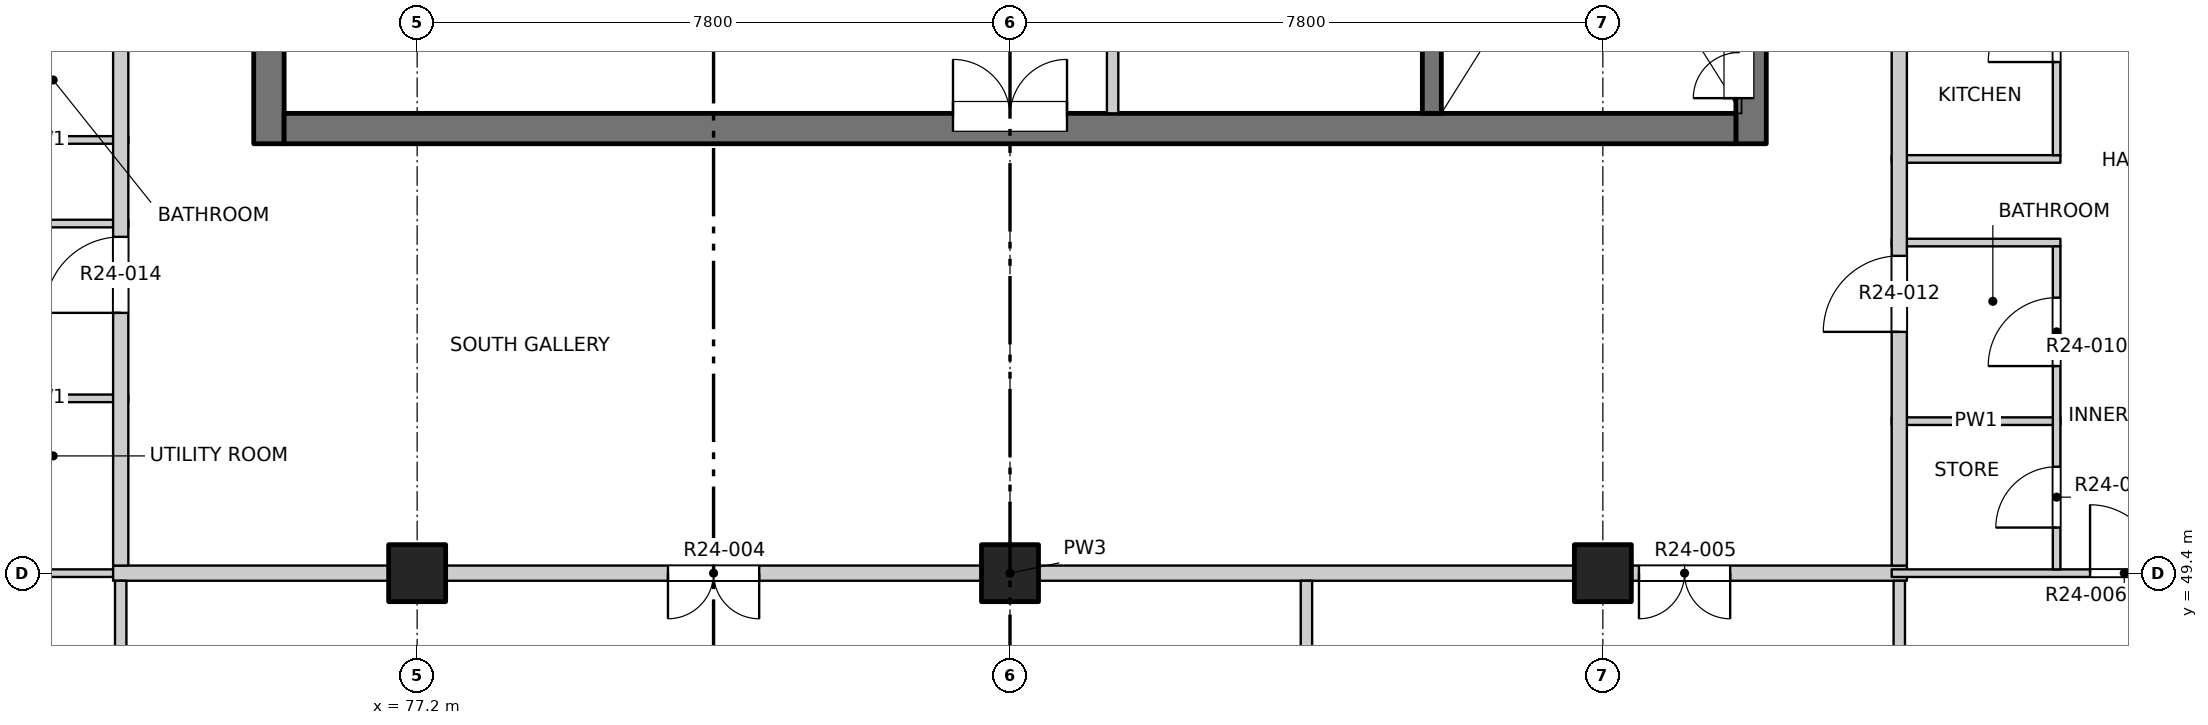
"""IFC4 building model, lengths in metres.
Left out: names, types, materials, properties, quantities, classifications, styles, units other than length and angle.
Written with IfcOpenShell. Run it as: python <this file> out.ifc"""

import sys

from ifc_helpers import new_model, si_unit, direction, frame, frame_2d, origin, origin_2d, place, context, subcontext, project, spatial, rectangle, extrude, element, fill, save


model = new_model("IFC4")
c1 = context("Model", 3, precision=1e-05, world=origin(), true_north=direction((0.0, 1.0)))
c2 = subcontext(c1, "Body", "Model", "MODEL_VIEW")
j1 = project(units=[si_unit("LENGTHUNIT", "METRE"), si_unit("PLANEANGLEUNIT", "RADIAN")], contexts=[c1])
p1 = place(None, origin())
s1 = spatial("IfcSite", under=j1, at=p1, CompositionType="ELEMENT")
p2 = place(p1, origin())
s2 = spatial("IfcBuilding", under=s1, at=p2, CompositionType="ELEMENT")
p3 = place(p2, frame((0.0, 0.0, 246.0)))
s3 = spatial("IfcBuildingStorey", under=s2, at=p3, CompositionType="ELEMENT", Elevation=246.0)
for number, where, z_axis, x_axis in (
    (1, (77.2, 49.4, -0.3), (0.0, 0.0, 1.0), (1.0, 0.0, 0.0)),
    (2, (85.0, 49.4, -0.3), (0.0, 0.0, 1.0), (1.0, 0.0, 0.0)),
    (3, (92.8, 49.4, -0.3), (0.0, 0.0, 1.0), (1.0, 0.0, 0.0)),
):
    element("IfcColumn", number, at=place(p3, frame(where, z_axis=z_axis, x_axis=x_axis)), inside=s3, PredefinedType="COLUMN", context=c2, shape_type="SweptSolid", body=[
        extrude(rectangle(XDim=0.75, YDim=0.75, at=origin_2d()), origin(), (0.0, 0.0, 1.0), 3.45),
    ])
p4 = place(p3, frame((75.25, 55.05, -0.3), z_axis=(0.0, 0.0, 1.0), x_axis=(0.0, 1.0, 0.0)))
e4 = element("IfcWall", 4, at=p4, inside=s3, PredefinedType="SOLIDWALL", context=c2, shape_type="SweptSolid", body=[
    extrude(rectangle(XDim=22.25, YDim=0.4, at=frame_2d((11.125, 0.0))), origin(), (0.0, 0.0, 1.0), 3.45),
])
p5 = place(p4, frame((7.4, 0.0, 0.3)))
e5 = element("IfcOpeningElement", 5, at=p5, cuts=e4, PredefinedType="OPENING", context=c2, shape_type="SweptSolid", body=[
    extrude(rectangle(XDim=0.9, YDim=2.1, at=frame_2d((0.45, 1.05))), frame((0.0, 0.21, 0.0), z_axis=(0.0, -1.0, 0.0), x_axis=(1.0, 0.0, 0.0)), (0.0, 0.0, 1.0), 0.42),
])
p6 = place(p4, frame((12.05, 0.0, 0.3)))
e6 = element("IfcOpeningElement", 6, at=p6, cuts=e4, PredefinedType="OPENING", context=c2, shape_type="SweptSolid", body=[
    extrude(rectangle(XDim=0.9, YDim=2.1, at=frame_2d((0.45, 1.05))), frame((0.0, 0.21, 0.0), z_axis=(0.0, -1.0, 0.0), x_axis=(1.0, 0.0, 0.0)), (0.0, 0.0, 1.0), 0.42),
])
p7 = place(p4, frame((16.55, 0.0, 0.3)))
e7 = element("IfcOpeningElement", 7, at=p7, cuts=e4, PredefinedType="OPENING", context=c2, shape_type="SweptSolid", body=[
    extrude(rectangle(XDim=0.9, YDim=2.1, at=frame_2d((0.45, 1.05))), frame((0.0, 0.21, 0.0), z_axis=(0.0, -1.0, 0.0), x_axis=(1.0, 0.0, 0.0)), (0.0, 0.0, 1.0), 0.42),
])
p8 = place(p4, frame((20.0, 0.0, 0.3)))
e8 = element("IfcOpeningElement", 8, at=p8, cuts=e4, PredefinedType="OPENING", context=c2, shape_type="SweptSolid", body=[
    extrude(rectangle(XDim=0.9, YDim=2.1, at=frame_2d((0.45, 1.05))), frame((0.0, 0.21, 0.0), z_axis=(0.0, -1.0, 0.0), x_axis=(1.0, 0.0, 0.0)), (0.0, 0.0, 1.0), 0.42),
])
p9 = place(p3, frame((94.75, 55.05, -0.3), z_axis=(0.0, 0.0, 1.0), x_axis=(0.0, 1.0, 0.0)))
e9 = element("IfcWall", 9, at=p9, inside=s3, PredefinedType="SOLIDWALL", context=c2, shape_type="SweptSolid", body=[
    extrude(rectangle(XDim=6.9, YDim=0.4, at=frame_2d((3.45, 0.0))), origin(), (0.0, 0.0, 1.0), 3.45),
])
p10 = place(p9, frame((0.6, 0.0, 0.3)))
e10 = element("IfcOpeningElement", 10, at=p10, cuts=e9, PredefinedType="OPENING", context=c2, shape_type="SweptSolid", body=[
    extrude(rectangle(XDim=1.2, YDim=2.1, at=frame_2d((0.6, 1.05))), frame((0.0, 0.21, 0.0), z_axis=(0.0, -1.0, 0.0), x_axis=(1.0, 0.0, 0.0)), (0.0, 0.0, 1.0), 0.42),
])
p11 = place(p3, frame((75.45, 55.25, -0.3), z_axis=(0.0, 0.0, 1.0), x_axis=(1.0, 0.0, 0.0)))
e11 = element("IfcWall", 11, at=p11, inside=s3, PredefinedType="SOLIDWALL", context=c2, shape_type="SweptSolid", body=[
    extrude(rectangle(XDim=19.1, YDim=0.4, at=frame_2d((9.55, 0.0))), origin(), (0.0, 0.0, 1.0), 3.45),
])
p12 = place(p11, frame((8.8, 0.0, 0.3)))
e12 = element("IfcOpeningElement", 12, at=p12, cuts=e11, PredefinedType="OPENING", context=c2, shape_type="SweptSolid", body=[
    extrude(rectangle(XDim=1.5, YDim=2.1, at=frame_2d((0.75, 1.05))), frame((0.0, 0.21, 0.0), z_axis=(0.0, -1.0, 0.0), x_axis=(1.0, 0.0, 0.0)), (0.0, 0.0, 1.0), 0.42),
])
p13 = place(p3, frame((90.55, 55.45, -0.3), z_axis=(0.0, 0.0, 1.0), x_axis=(0.0, 1.0, 0.0)))
e13 = element("IfcWall", 13, at=p13, inside=s3, PredefinedType="SOLIDWALL", context=c2, shape_type="SweptSolid", body=[
    extrude(rectangle(XDim=6.5, YDim=0.25, at=frame_2d((3.25, 0.0))), origin(), (0.0, 0.0, 1.0), 3.45),
])
p14 = place(p3, frame((65.8, 49.4, 0.0), z_axis=(0.0, 0.0, 1.0), x_axis=(1.0, 0.0, 0.0)))
e14 = element("IfcWall", 14, at=p14, inside=s3, PredefinedType="PARTITIONING", context=c2, shape_type="SweptSolid", body=[
    extrude(rectangle(XDim=7.6, YDim=0.1, at=frame_2d((3.8, 0.0))), origin(), (0.0, 0.0, 1.0), 3.15),
])
p15 = place(p14, frame((4.09, 0.0, 0.0)))
e15 = element("IfcOpeningElement", 15, at=p15, cuts=e14, PredefinedType="OPENING", context=c2, shape_type="SweptSolid", body=[
    extrude(rectangle(XDim=0.9, YDim=2.1, at=frame_2d((0.45, 1.05))), frame((0.0, 0.06, 0.0), z_axis=(0.0, -1.0, 0.0), x_axis=(1.0, 0.0, 0.0)), (0.0, 0.0, 1.0), 0.12),
])
p16 = place(p3, frame((73.2, 49.4, 0.0), z_axis=(0.0, 0.0, 1.0), x_axis=(1.0, 0.0, 0.0)))
e16 = element("IfcWall", 16, at=p16, inside=s3, PredefinedType="PARTITIONING", context=c2, shape_type="SweptSolid", body=[
    extrude(rectangle(XDim=23.6, YDim=0.2, at=frame_2d((11.8, 0.0))), origin(), (0.0, 0.0, 1.0), 3.15),
])
p17 = place(p16, frame((7.3, 0.0, 0.0)))
e17 = element("IfcOpeningElement", 17, at=p17, cuts=e16, PredefinedType="OPENING", context=c2, shape_type="SweptSolid", body=[
    extrude(rectangle(XDim=1.2, YDim=2.1, at=frame_2d((0.6, 1.05))), frame((0.0, 0.11, 0.0), z_axis=(0.0, -1.0, 0.0), x_axis=(1.0, 0.0, 0.0)), (0.0, 0.0, 1.0), 0.22),
])
p18 = place(p16, frame((20.075, 0.0, 0.0)))
e18 = element("IfcOpeningElement", 18, at=p18, cuts=e16, PredefinedType="OPENING", context=c2, shape_type="SweptSolid", body=[
    extrude(rectangle(XDim=1.2, YDim=2.1, at=frame_2d((0.6, 1.05))), frame((0.0, 0.11, 0.0), z_axis=(0.0, -1.0, 0.0), x_axis=(1.0, 0.0, 0.0)), (0.0, 0.0, 1.0), 0.22),
])
p19 = place(p3, frame((96.6, 49.4, 0.0), z_axis=(0.0, 0.0, 1.0), x_axis=(1.0, 0.0, 0.0)))
e19 = element("IfcWall", 19, at=p19, inside=s3, PredefinedType="PARTITIONING", context=c2, shape_type="SweptSolid", body=[
    extrude(rectangle(XDim=7.6, YDim=0.1, at=frame_2d((3.8, 0.0))), origin(), (0.0, 0.0, 1.0), 3.15),
])
p20 = place(p19, frame((2.61, 0.0, 0.0)))
e20 = element("IfcOpeningElement", 20, at=p20, cuts=e19, PredefinedType="OPENING", context=c2, shape_type="SweptSolid", body=[
    extrude(rectangle(XDim=0.9, YDim=2.1, at=frame_2d((0.45, 1.05))), frame((0.0, 0.06, 0.0), z_axis=(0.0, -1.0, 0.0), x_axis=(1.0, 0.0, 0.0)), (0.0, 0.0, 1.0), 0.12),
])
for number, where, z_axis, x_axis in (
    (21, (96.6, 51.4, 0.0), (0.0, 0.0, 1.0), (1.0, 0.0, 0.0)),
    (22, (71.18, 51.7, 0.0), (0.0, 0.0, 1.0), (1.0, 0.0, 0.0)),
    (23, (96.6, 53.75, 0.0), (0.0, 0.0, 1.0), (1.0, 0.0, 0.0)),
    (24, (71.18, 54.0, 0.0), (0.0, 0.0, 1.0), (1.0, 0.0, 0.0)),
    (25, (96.6, 54.85, 0.0), (0.0, 0.0, 1.0), (1.0, 0.0, 0.0)),
    (26, (71.18, 55.1, 0.0), (0.0, 0.0, 1.0), (1.0, 0.0, 0.0)),
):
    element("IfcWall", number, at=place(p3, frame(where, z_axis=z_axis, x_axis=x_axis)), inside=s3, PredefinedType="PARTITIONING", context=c2, shape_type="SweptSolid", body=[
        extrude(rectangle(XDim=2.22, YDim=0.1, at=frame_2d((1.11, 0.0))), origin(), (0.0, 0.0, 1.0), 3.15),
    ])
p21 = place(p3, frame((73.3, 45.8, 0.0), z_axis=(0.0, 0.0, 1.0), x_axis=(0.0, 1.0, 0.0)))
e27 = element("IfcWall", 27, at=p21, inside=s3, PredefinedType="PARTITIONING", context=c2, shape_type="SweptSolid", body=[
    extrude(rectangle(XDim=3.5, YDim=0.15, at=frame_2d((1.75, 0.0))), origin(), (0.0, 0.0, 1.0), 3.15),
])
p22 = place(p3, frame((73.3, 49.5, 0.0), z_axis=(0.0, 0.0, 1.0), x_axis=(0.0, 1.0, 0.0)))
e28 = element("IfcWall", 28, at=p22, inside=s3, PredefinedType="PARTITIONING", context=c2, shape_type="SweptSolid", body=[
    extrude(rectangle(XDim=34.7, YDim=0.2, at=frame_2d((17.35, 0.0))), origin(), (0.0, 0.0, 1.0), 3.15),
])
p23 = place(p22, frame((3.325, 0.0, 0.0)))
e29 = element("IfcOpeningElement", 29, at=p23, cuts=e28, PredefinedType="OPENING", context=c2, shape_type="SweptSolid", body=[
    extrude(rectangle(XDim=1.0, YDim=2.1, at=frame_2d((0.5, 1.05))), frame((0.0, 0.11, 0.0), z_axis=(0.0, -1.0, 0.0), x_axis=(1.0, 0.0, 0.0)), (0.0, 0.0, 1.0), 0.22),
])
p24 = place(p22, frame((17.875, 0.0, 0.0)))
e30 = element("IfcOpeningElement", 30, at=p24, cuts=e28, PredefinedType="OPENING", context=c2, shape_type="SweptSolid", body=[
    extrude(rectangle(XDim=1.0, YDim=2.1, at=frame_2d((0.5, 1.05))), frame((0.0, 0.11, 0.0), z_axis=(0.0, -1.0, 0.0), x_axis=(1.0, 0.0, 0.0)), (0.0, 0.0, 1.0), 0.22),
])
p25 = place(p22, frame((25.775, 0.0, 0.0)))
e31 = element("IfcOpeningElement", 31, at=p25, cuts=e28, PredefinedType="OPENING", context=c2, shape_type="SweptSolid", body=[
    extrude(rectangle(XDim=1.0, YDim=2.1, at=frame_2d((0.5, 1.05))), frame((0.0, 0.11, 0.0), z_axis=(0.0, -1.0, 0.0), x_axis=(1.0, 0.0, 0.0)), (0.0, 0.0, 1.0), 0.22),
])
p26 = place(p3, frame((86.35, 55.45, 0.0), z_axis=(0.0, 0.0, 1.0), x_axis=(0.0, 1.0, 0.0)))
e32 = element("IfcWall", 32, at=p26, inside=s3, PredefinedType="PARTITIONING", context=c2, shape_type="SweptSolid", body=[
    extrude(rectangle(XDim=5.575, YDim=0.15, at=frame_2d((2.788, 0.0))), origin(), (0.0, 0.0, 1.0), 3.15),
])
p27 = place(p26, frame((2.25, 0.0, 0.0)))
e33 = element("IfcOpeningElement", 33, at=p27, cuts=e32, PredefinedType="OPENING", context=c2, shape_type="SweptSolid", body=[
    extrude(rectangle(XDim=0.9, YDim=2.1, at=frame_2d((0.45, 1.05))), frame((0.0, 0.085, 0.0), z_axis=(0.0, -1.0, 0.0), x_axis=(1.0, 0.0, 0.0)), (0.0, 0.0, 1.0), 0.17),
])
p28 = place(p3, frame((88.9, 45.8, 0.0), z_axis=(0.0, 0.0, 1.0), x_axis=(0.0, 1.0, 0.0)))
e34 = element("IfcWall", 34, at=p28, inside=s3, PredefinedType="PARTITIONING", context=c2, shape_type="SweptSolid", body=[
    extrude(rectangle(XDim=3.5, YDim=0.15, at=frame_2d((1.75, 0.0))), origin(), (0.0, 0.0, 1.0), 2.55),
])
p29 = place(p3, frame((96.7, 45.8, 0.0), z_axis=(0.0, 0.0, 1.0), x_axis=(0.0, 1.0, 0.0)))
e35 = element("IfcWall", 35, at=p29, inside=s3, PredefinedType="PARTITIONING", context=c2, shape_type="SweptSolid", body=[
    extrude(rectangle(XDim=3.5, YDim=0.15, at=frame_2d((1.75, 0.0))), origin(), (0.0, 0.0, 1.0), 3.15),
])
p30 = place(p3, frame((96.7, 49.5, 0.0), z_axis=(0.0, 0.0, 1.0), x_axis=(0.0, 1.0, 0.0)))
e36 = element("IfcWall", 36, at=p30, inside=s3, PredefinedType="PARTITIONING", context=c2, shape_type="SweptSolid", body=[
    extrude(rectangle(XDim=34.7, YDim=0.2, at=frame_2d((17.35, 0.0))), origin(), (0.0, 0.0, 1.0), 3.15),
])
p31 = place(p30, frame((3.075, 0.0, 0.0)))
e37 = element("IfcOpeningElement", 37, at=p31, cuts=e36, PredefinedType="OPENING", context=c2, shape_type="SweptSolid", body=[
    extrude(rectangle(XDim=1.0, YDim=2.1, at=frame_2d((0.5, 1.05))), frame((0.0, 0.11, 0.0), z_axis=(0.0, -1.0, 0.0), x_axis=(1.0, 0.0, 0.0)), (0.0, 0.0, 1.0), 0.22),
])
p32 = place(p30, frame((18.425, 0.0, 0.0)))
e38 = element("IfcOpeningElement", 38, at=p32, cuts=e36, PredefinedType="OPENING", context=c2, shape_type="SweptSolid", body=[
    extrude(rectangle(XDim=1.0, YDim=2.1, at=frame_2d((0.5, 1.05))), frame((0.0, 0.11, 0.0), z_axis=(0.0, -1.0, 0.0), x_axis=(1.0, 0.0, 0.0)), (0.0, 0.0, 1.0), 0.22),
])
p33 = place(p30, frame((25.825, 0.0, 0.0)))
e39 = element("IfcOpeningElement", 39, at=p33, cuts=e36, PredefinedType="OPENING", context=c2, shape_type="SweptSolid", body=[
    extrude(rectangle(XDim=1.0, YDim=2.1, at=frame_2d((0.5, 1.05))), frame((0.0, 0.11, 0.0), z_axis=(0.0, -1.0, 0.0), x_axis=(1.0, 0.0, 0.0)), (0.0, 0.0, 1.0), 0.22),
])
p34 = place(p3, frame((98.77, 49.45, 0.0), z_axis=(0.0, 0.0, 1.0), x_axis=(0.0, 1.0, 0.0)))
e40 = element("IfcWall", 40, at=p34, inside=s3, PredefinedType="PARTITIONING", context=c2, shape_type="SweptSolid", body=[
    extrude(rectangle(XDim=4.25, YDim=0.1, at=frame_2d((2.125, 0.0))), origin(), (0.0, 0.0, 1.0), 3.15),
])
p35 = place(p34, frame((0.55, 0.0, 0.0)))
e41 = element("IfcOpeningElement", 41, at=p35, cuts=e40, PredefinedType="OPENING", context=c2, shape_type="SweptSolid", body=[
    extrude(rectangle(XDim=0.8, YDim=2.1, at=frame_2d((0.4, 1.05))), frame((0.0, 0.06, 0.0), z_axis=(0.0, -1.0, 0.0), x_axis=(1.0, 0.0, 0.0)), (0.0, 0.0, 1.0), 0.12),
])
p36 = place(p34, frame((2.675, 0.0, 0.0)))
e42 = element("IfcOpeningElement", 42, at=p36, cuts=e40, PredefinedType="OPENING", context=c2, shape_type="SweptSolid", body=[
    extrude(rectangle(XDim=0.9, YDim=2.1, at=frame_2d((0.45, 1.05))), frame((0.0, 0.06, 0.0), z_axis=(0.0, -1.0, 0.0), x_axis=(1.0, 0.0, 0.0)), (0.0, 0.0, 1.0), 0.12),
])
p37 = place(p3, frame((98.77, 54.9, 0.0), z_axis=(0.0, 0.0, 1.0), x_axis=(0.0, 1.0, 0.0)))
e43 = element("IfcWall", 43, at=p37, inside=s3, PredefinedType="PARTITIONING", context=c2, shape_type="SweptSolid", body=[
    extrude(rectangle(XDim=11.7, YDim=0.1, at=frame_2d((5.85, 0.0))), origin(), (0.0, 0.0, 1.0), 3.15),
])
p38 = place(p37, frame((1.225, 0.0, 0.0)))
e44 = element("IfcOpeningElement", 44, at=p38, cuts=e43, PredefinedType="OPENING", context=c2, shape_type="SweptSolid", body=[
    extrude(rectangle(XDim=0.9, YDim=2.1, at=frame_2d((0.45, 1.05))), frame((0.0, 0.06, 0.0), z_axis=(0.0, -1.0, 0.0), x_axis=(1.0, 0.0, 0.0)), (0.0, 0.0, 1.0), 0.12),
])
p39 = place(p37, frame((3.85, 0.0, 0.0)))
e45 = element("IfcOpeningElement", 45, at=p39, cuts=e43, PredefinedType="OPENING", context=c2, shape_type="SweptSolid", body=[
    extrude(rectangle(XDim=0.9, YDim=2.1, at=frame_2d((0.45, 1.05))), frame((0.0, 0.06, 0.0), z_axis=(0.0, -1.0, 0.0), x_axis=(1.0, 0.0, 0.0)), (0.0, 0.0, 1.0), 0.12),
])
p40 = place(p37, frame((5.95, 0.0, 0.0)))
e46 = element("IfcOpeningElement", 46, at=p40, cuts=e43, PredefinedType="OPENING", context=c2, shape_type="SweptSolid", body=[
    extrude(rectangle(XDim=0.8, YDim=2.1, at=frame_2d((0.4, 1.05))), frame((0.0, 0.06, 0.0), z_axis=(0.0, -1.0, 0.0), x_axis=(1.0, 0.0, 0.0)), (0.0, 0.0, 1.0), 0.12),
])
p41 = place(p37, frame((8.4, 0.0, 0.0)))
e47 = element("IfcOpeningElement", 47, at=p41, cuts=e43, PredefinedType="OPENING", context=c2, shape_type="SweptSolid", body=[
    extrude(rectangle(XDim=0.8, YDim=2.1, at=frame_2d((0.4, 1.05))), frame((0.0, 0.06, 0.0), z_axis=(0.0, -1.0, 0.0), x_axis=(1.0, 0.0, 0.0)), (0.0, 0.0, 1.0), 0.12),
])
p42 = place(p37, frame((10.475, 0.0, 0.0)))
e48 = element("IfcOpeningElement", 48, at=p42, cuts=e43, PredefinedType="OPENING", context=c2, shape_type="SweptSolid", body=[
    extrude(rectangle(XDim=0.9, YDim=2.1, at=frame_2d((0.45, 1.05))), frame((0.0, 0.06, 0.0), z_axis=(0.0, -1.0, 0.0), x_axis=(1.0, 0.0, 0.0)), (0.0, 0.0, 1.0), 0.12),
])
p43 = place(p17, origin())
e49 = element("IfcDoor", 49, at=p43, inside=s3, OperationType="DOUBLE_DOOR_SINGLE_SWING", PredefinedType="DOOR", context=c2, shape_type="SweptSolid", body=[
    extrude(rectangle(XDim=1.2, YDim=2.1, at=frame_2d((0.6, 1.05))), frame((0.0, 0.025, 0.0), z_axis=(0.0, -1.0, 0.0), x_axis=(1.0, 0.0, 0.0)), (0.0, 0.0, 1.0), 0.05),
])
fill(e17, e49)
p44 = place(p18, origin())
e50 = element("IfcDoor", 50, at=p44, inside=s3, OperationType="DOUBLE_DOOR_SINGLE_SWING", PredefinedType="DOOR", context=c2, shape_type="SweptSolid", body=[
    extrude(rectangle(XDim=1.2, YDim=2.1, at=frame_2d((0.6, 1.05))), frame((0.0, 0.025, 0.0), z_axis=(0.0, -1.0, 0.0), x_axis=(1.0, 0.0, 0.0)), (0.0, 0.0, 1.0), 0.05),
])
fill(e18, e50)
p45 = place(p20, origin())
e51 = element("IfcDoor", 51, at=p45, inside=s3, OperationType="SINGLE_SWING_LEFT", PredefinedType="DOOR", context=c2, shape_type="SweptSolid", body=[
    extrude(rectangle(XDim=0.9, YDim=2.1, at=frame_2d((0.45, 1.05))), frame((0.0, 0.025, 0.0), z_axis=(0.0, -1.0, 0.0), x_axis=(1.0, 0.0, 0.0)), (0.0, 0.0, 1.0), 0.05),
])
fill(e20, e51)
p46 = place(p35, origin())
e52 = element("IfcDoor", 52, at=p46, inside=s3, OperationType="SINGLE_SWING_LEFT", PredefinedType="DOOR", context=c2, shape_type="SweptSolid", body=[
    extrude(rectangle(XDim=0.8, YDim=2.1, at=frame_2d((0.4, 1.05))), frame((0.0, 0.025, 0.0), z_axis=(0.0, -1.0, 0.0), x_axis=(1.0, 0.0, 0.0)), (0.0, 0.0, 1.0), 0.05),
])
fill(e41, e52)
p47 = place(p36, origin())
e53 = element("IfcDoor", 53, at=p47, inside=s3, OperationType="SINGLE_SWING_LEFT", PredefinedType="DOOR", context=c2, shape_type="SweptSolid", body=[
    extrude(rectangle(XDim=0.9, YDim=2.1, at=frame_2d((0.45, 1.05))), frame((0.0, 0.025, 0.0), z_axis=(0.0, -1.0, 0.0), x_axis=(1.0, 0.0, 0.0)), (0.0, 0.0, 1.0), 0.05),
])
fill(e42, e53)
p48 = place(p31, origin())
e54 = element("IfcDoor", 54, at=p48, inside=s3, OperationType="SINGLE_SWING_RIGHT", PredefinedType="DOOR", context=c2, shape_type="SweptSolid", body=[
    extrude(rectangle(XDim=1.0, YDim=2.1, at=frame_2d((0.5, 1.05))), frame((0.0, 0.025, 0.0), z_axis=(0.0, -1.0, 0.0), x_axis=(1.0, 0.0, 0.0)), (0.0, 0.0, 1.0), 0.05),
])
fill(e37, e54)
p49 = place(p23, origin())
e55 = element("IfcDoor", 55, at=p49, inside=s3, OperationType="SINGLE_SWING_LEFT", PredefinedType="DOOR", context=c2, shape_type="SweptSolid", body=[
    extrude(rectangle(XDim=1.0, YDim=2.1, at=frame_2d((0.5, 1.05))), frame((0.0, 0.025, 0.0), z_axis=(0.0, -1.0, 0.0), x_axis=(1.0, 0.0, 0.0)), (0.0, 0.0, 1.0), 0.05),
])
fill(e29, e55)
p50 = place(p12, origin())
e56 = element("IfcDoor", 56, at=p50, inside=s3, OperationType="DOUBLE_DOOR_SINGLE_SWING", PredefinedType="DOOR", context=c2, shape_type="SweptSolid", body=[
    extrude(rectangle(XDim=1.5, YDim=2.1, at=frame_2d((0.75, 1.05))), frame((0.0, 0.185, 0.0), z_axis=(0.0, -1.0, 0.0), x_axis=(1.0, 0.0, 0.0)), (0.0, 0.0, 1.0), 0.05),
])
fill(e12, e56)
p51 = place(p10, origin())
e57 = element("IfcDoor", 57, at=p51, inside=s3, OperationType="DOUBLE_DOOR_SINGLE_SWING", PredefinedType="DOOR", context=c2, shape_type="SweptSolid", body=[
    extrude(rectangle(XDim=1.2, YDim=2.1, at=frame_2d((0.6, 1.05))), frame((0.0, 0.185, 0.0), z_axis=(0.0, -1.0, 0.0), x_axis=(1.0, 0.0, 0.0)), (0.0, 0.0, 1.0), 0.05),
])
fill(e10, e57)
p52 = place(p38, origin())
e58 = element("IfcDoor", 58, at=p52, inside=s3, OperationType="SINGLE_SWING_LEFT", PredefinedType="DOOR", context=c2, shape_type="SweptSolid", body=[
    extrude(rectangle(XDim=0.9, YDim=2.1, at=frame_2d((0.45, 1.05))), frame((0.0, 0.025, 0.0), z_axis=(0.0, -1.0, 0.0), x_axis=(1.0, 0.0, 0.0)), (0.0, 0.0, 1.0), 0.05),
])
fill(e44, e58)
save(model, sys.argv[1])
